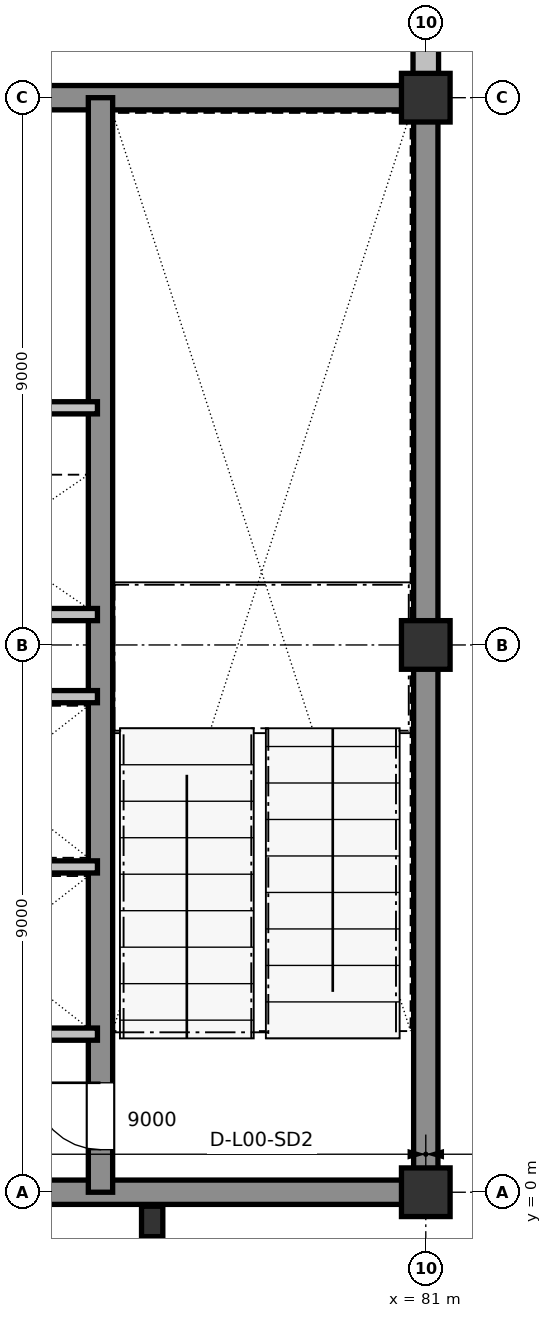
"""IFC4 building model, lengths in metres.
Left out: names, types, materials, properties, quantities, classifications, styles, units other than length and angle.
Written with IfcOpenShell. Run it as: python <this file> out.ifc"""

import sys

from ifc_helpers import new_model, si_unit, direction, frame, frame_2d, origin, origin_2d, place, context, subcontext, project, spatial, rectangle, extrude, element, fill, save


model = new_model("IFC4")
c1 = context("Model", 3, precision=1e-05, world=origin(), true_north=direction((0.0, 1.0)))
c2 = subcontext(c1, "Body", "Model", "MODEL_VIEW")
j1 = project(units=[si_unit("LENGTHUNIT", "METRE"), si_unit("PLANEANGLEUNIT", "RADIAN")], contexts=[c1])
p1 = place(None, origin())
s1 = spatial("IfcSite", under=j1, at=p1, CompositionType="ELEMENT")
p2 = place(p1, origin())
s2 = spatial("IfcBuilding", under=s1, at=p2, CompositionType="ELEMENT")
p3 = place(p2, origin())
s3 = spatial("IfcBuildingStorey", under=s2, at=p3, CompositionType="ELEMENT", Elevation=0.0)
p4 = place(p3, frame((76.5, -0.48, 0.0), z_axis=(0.0, 0.0, 1.0), x_axis=(1.0, 0.0, 0.0)))
e1 = element("IfcColumn", 1, at=p4, inside=s3, PredefinedType="PILASTER", context=c2, shape_type="SweptSolid", body=[
    extrude(rectangle(XDim=0.35, YDim=0.5, at=origin_2d()), origin(), (0.0, 0.0, 1.0), 5.4),
])
for number, where, z_axis, x_axis in (
    (2, (81.0, 0.0, 0.0), (0.0, 0.0, 1.0), (1.0, 0.0, 0.0)),
    (3, (81.0, 9.0, 0.0), (0.0, 0.0, 1.0), (1.0, 0.0, 0.0)),
    (4, (81.0, 18.0, 0.0), (0.0, 0.0, 1.0), (1.0, 0.0, 0.0)),
):
    element("IfcColumn", number, at=place(p3, frame(where, z_axis=z_axis, x_axis=x_axis)), inside=s3, PredefinedType="COLUMN", context=c2, shape_type="SweptSolid", body=[
        extrude(rectangle(XDim=0.8, YDim=0.8, at=origin_2d()), origin(), (0.0, 0.0, 1.0), 5.4),
    ])
p5 = place(p3, frame((81.0, 18.385, 0.0), z_axis=(0.0, 0.0, 1.0), x_axis=(0.0, 1.0, 0.0)))
e5 = element("IfcWall", 5, at=p5, inside=s3, PredefinedType="STANDARD", context=c2, shape_type="SweptSolid", body=[
    extrude(rectangle(XDim=2.69, YDim=0.42, at=frame_2d((1.345, 0.0))), origin(), (0.0, 0.0, 1.0), 5.14),
])
p6 = place(p3, frame((72.0, 0.0, 0.0), z_axis=(0.0, 0.0, 1.0), x_axis=(1.0, 0.0, 0.0)))
e6 = element("IfcWall", 6, at=p6, inside=s3, PredefinedType="SHEAR", context=c2, shape_type="SweptSolid", body=[
    extrude(rectangle(XDim=9.0, YDim=0.4, at=frame_2d((4.5, 0.0))), origin(), (0.0, 0.0, 1.0), 5.16),
])
p7 = place(p6, frame((5.4, 0.0, 0.0)))
e7 = element("IfcOpeningElement", 7, at=p7, cuts=e6, PredefinedType="OPENING", context=c2, shape_type="SweptSolid", body=[
    extrude(rectangle(XDim=1.8, YDim=2.35, at=frame_2d((0.9, 1.175))), frame((0.0, 0.21, 0.0), z_axis=(0.0, -1.0, 0.0), x_axis=(1.0, 0.0, 0.0)), (0.0, 0.0, 1.0), 0.42),
])
p8 = place(p3, frame((81.0, 0.0, 0.0), z_axis=(0.0, 0.0, 1.0), x_axis=(0.0, 1.0, 0.0)))
e8 = element("IfcWall", 8, at=p8, inside=s3, PredefinedType="SHEAR", context=c2, shape_type="SweptSolid", body=[
    extrude(rectangle(XDim=18.0, YDim=0.4, at=frame_2d((9.0, 0.0))), origin(), (0.0, 0.0, 1.0), 5.16),
])
p9 = place(p3, frame((81.0, 18.0, 0.0), z_axis=(0.0, 0.0, 1.0), x_axis=(-1.0, 0.0, 0.0)))
e9 = element("IfcWall", 9, at=p9, inside=s3, PredefinedType="SHEAR", context=c2, shape_type="SweptSolid", body=[
    extrude(rectangle(XDim=9.0, YDim=0.4, at=frame_2d((4.5, 0.0))), origin(), (0.0, 0.0, 1.0), 5.16),
])
p10 = place(p3, frame((75.65, 0.0, 0.0), z_axis=(0.0, 0.0, 1.0), x_axis=(0.0, 1.0, 0.0)))
e10 = element("IfcWall", 10, at=p10, inside=s3, PredefinedType="SHEAR", context=c2, shape_type="SweptSolid", body=[
    extrude(rectangle(XDim=18.0, YDim=0.4, at=frame_2d((9.0, 0.0))), origin(), (0.0, 0.0, 1.0), 5.16),
])
p11 = place(p10, frame((0.7, 0.0, 0.0)))
e11 = element("IfcOpeningElement", 11, at=p11, cuts=e10, PredefinedType="OPENING", context=c2, shape_type="SweptSolid", body=[
    extrude(rectangle(XDim=1.1, YDim=2.16, at=frame_2d((0.55, 1.08))), frame((0.0, 0.21, 0.0), z_axis=(0.0, -1.0, 0.0), x_axis=(1.0, 0.0, 0.0)), (0.0, 0.0, 1.0), 0.42),
])
for number, where, z_axis, x_axis in (
    (12, (72.1, 2.6, 0.0), (0.0, 0.0, 1.0), (1.0, 0.0, 0.0)),
    (13, (72.1, 5.35, 0.0), (0.0, 0.0, 1.0), (1.0, 0.0, 0.0)),
    (14, (72.1, 8.15, 0.0), (0.0, 0.0, 1.0), (1.0, 0.0, 0.0)),
    (15, (72.1, 9.5, 0.0), (0.0, 0.0, 1.0), (1.0, 0.0, 0.0)),
    (16, (72.1, 12.9, 0.0), (0.0, 0.0, 1.0), (1.0, 0.0, 0.0)),
):
    element("IfcWall", number, at=place(p3, frame(where, z_axis=z_axis, x_axis=x_axis)), inside=s3, PredefinedType="PARTITIONING", context=c2, shape_type="SweptSolid", body=[
        extrude(rectangle(XDim=3.5, YDim=0.2, at=frame_2d((1.75, 0.0))), origin(), (0.0, 0.0, 1.0), 5.16),
    ])
p12 = place(p7, frame((1.8, 0.0, 0.0), z_axis=(0.0, 0.0, 1.0), x_axis=(-1.0, 0.0, 0.0)))
e17 = element("IfcDoor", 17, at=p12, inside=s3, OperationType="DOUBLE_DOOR_SINGLE_SWING", PredefinedType="DOOR", context=c2, shape_type="SweptSolid", body=[
    extrude(rectangle(XDim=1.8, YDim=2.35, at=frame_2d((0.9, 1.175))), frame((0.0, 0.025, 0.0), z_axis=(0.0, -1.0, 0.0), x_axis=(1.0, 0.0, 0.0)), (0.0, 0.0, 1.0), 0.05),
])
fill(e7, e17)
p13 = place(p11, origin())
e18 = element("IfcDoor", 18, at=p13, inside=s3, OperationType="SINGLE_SWING_RIGHT", PredefinedType="DOOR", context=c2, shape_type="SweptSolid", body=[
    extrude(rectangle(XDim=1.1, YDim=2.16, at=frame_2d((0.55, 1.08))), frame((0.0, 0.025, 0.0), z_axis=(0.0, -1.0, 0.0), x_axis=(1.0, 0.0, 0.0)), (0.0, 0.0, 1.0), 0.05),
])
fill(e11, e18)
save(model, sys.argv[1])
